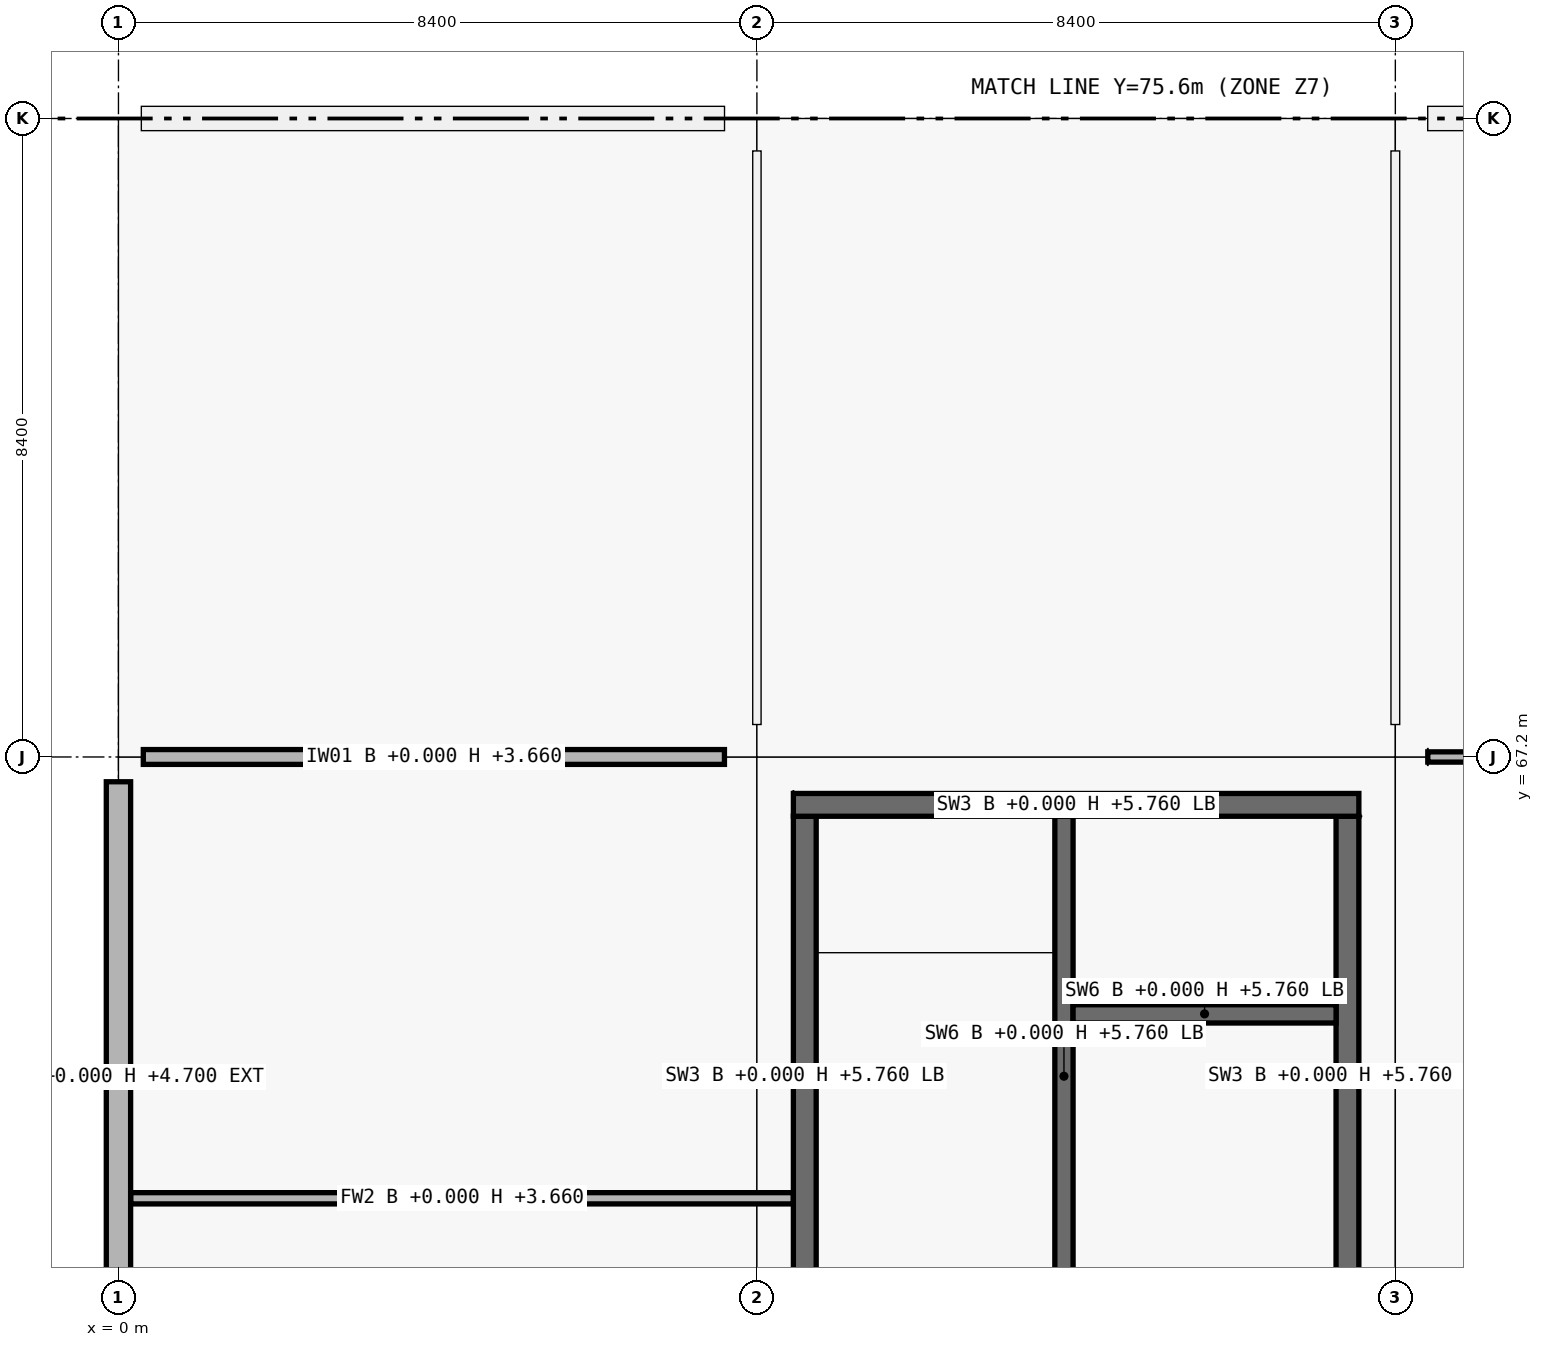
"""IFC4 building model, lengths in metres.
Left out: names, types, materials, properties, quantities, classifications, styles, units other than length and angle.
Written with IfcOpenShell. Run it as: python <this file> out.ifc"""

import sys

from ifc_helpers import new_model, si_unit, direction, frame, frame_2d, origin, origin_2d, place, context, subcontext, project, spatial, rectangle, extrude, element, fill, save


model = new_model("IFC4")
c1 = context("Model", 3, precision=1e-05, world=origin(), true_north=direction((0.0, 1.0)))
c2 = subcontext(c1, "Body", "Model", "MODEL_VIEW")
j1 = project(units=[si_unit("LENGTHUNIT", "METRE"), si_unit("PLANEANGLEUNIT", "RADIAN")], contexts=[c1])
p1 = place(None, origin())
s1 = spatial("IfcSite", under=j1, at=p1, CompositionType="ELEMENT")
p2 = place(p1, origin())
s2 = spatial("IfcBuilding", under=s1, at=p2, CompositionType="ELEMENT")
p3 = place(p2, origin())
s3 = spatial("IfcBuildingStorey", under=s2, at=p3, CompositionType="ELEMENT", Elevation=0.0)
p4 = place(p3, frame((0.0, 67.2, 0.0), z_axis=(0.0, 0.0, 1.0), x_axis=(1.0, 0.0, 0.0)))
e1 = element("IfcColumn", 1, at=p4, inside=s3, PredefinedType="COLUMN", context=c2, shape_type="SweptSolid", body=[
    extrude(rectangle(XDim=0.65, YDim=0.65, at=origin_2d()), origin(), (0.0, 0.0, 1.0), 5.76),
])
p5 = place(p3, frame((0.0, 75.6, 0.0), z_axis=(0.0, 0.0, 1.0), x_axis=(1.0, 0.0, 0.0)))
e2 = element("IfcColumn", 2, at=p5, inside=s3, PredefinedType="COLUMN", context=c2, shape_type="SweptSolid", body=[
    extrude(rectangle(XDim=0.6, YDim=0.6, at=origin_2d()), origin(), (0.0, 0.0, 1.0), 5.76),
])
for number, where, z_axis, x_axis in (
    (3, (8.4, 67.2, 0.0), (0.0, 0.0, 1.0), (1.0, 0.0, 0.0)),
    (4, (8.4, 75.6, 0.0), (0.0, 0.0, 1.0), (1.0, 0.0, 0.0)),
    (5, (16.8, 67.2, 0.0), (0.0, 0.0, 1.0), (1.0, 0.0, 0.0)),
    (6, (16.8, 75.6, 0.0), (0.0, 0.0, 1.0), (1.0, 0.0, 0.0)),
):
    element("IfcColumn", number, at=place(p3, frame(where, z_axis=z_axis, x_axis=x_axis)), inside=s3, PredefinedType="COLUMN", context=c2, shape_type="SweptSolid", body=[
        extrude(rectangle(XDim=0.85, YDim=0.85, at=origin_2d()), origin(), (0.0, 0.0, 1.0), 5.76),
    ])
p6 = place(p3, frame((0.0, 59.101, 0.0), z_axis=(0.0, 0.0, 1.0), x_axis=(0.0, 1.0, 0.0)))
e7 = element("IfcWall", 7, at=p6, inside=s3, PredefinedType="SOLIDWALL", context=c2, shape_type="SweptSolid", body=[
    extrude(rectangle(XDim=7.773, YDim=0.32, at=frame_2d((3.886, 0.0))), origin(), (0.0, 0.0, 1.0), 4.7),
])
p7 = place(p6, frame((3.136, 0.0, 0.9)))
e8 = element("IfcOpeningElement", 8, at=p7, cuts=e7, PredefinedType="OPENING", context=c2, shape_type="SweptSolid", body=[
    extrude(rectangle(XDim=1.5, YDim=1.8, at=frame_2d((0.75, 0.9))), frame((0.0, 0.16, 0.0), z_axis=(0.0, -1.0, 0.0), x_axis=(1.0, 0.0, 0.0)), (0.0, 0.0, 1.0), 0.32),
])
p8 = place(p6, frame((0.149, 0.0, 0.0)))
e9 = element("IfcOpeningElement", 9, at=p8, cuts=e7, PredefinedType="OPENING", context=c2, shape_type="SweptSolid", body=[
    extrude(rectangle(XDim=2.0, YDim=2.25, at=frame_2d((1.0, 1.125))), frame((0.0, 0.16, 0.0), z_axis=(0.0, -1.0, 0.0), x_axis=(1.0, 0.0, 0.0)), (0.0, 0.0, 1.0), 0.32),
])
p9 = place(p3, frame((0.301, 75.6, 0.0), z_axis=(0.0, 0.0, 1.0), x_axis=(1.0, 0.0, 0.0)))
e10 = element("IfcWall", 10, at=p9, inside=s3, PredefinedType="SOLIDWALL", context=c2, shape_type="SweptSolid", body=[
    extrude(rectangle(XDim=7.673, YDim=0.32, at=frame_2d((3.836, 0.0))), origin(), (0.0, 0.0, 1.0), 4.7),
])
p10 = place(p9, frame((3.037, 0.0, 0.9)))
e11 = element("IfcOpeningElement", 11, at=p10, cuts=e10, PredefinedType="OPENING", context=c2, shape_type="SweptSolid", body=[
    extrude(rectangle(XDim=1.6, YDim=2.1, at=frame_2d((0.8, 1.05))), frame((0.0, 0.16, 0.0), z_axis=(0.0, -1.0, 0.0), x_axis=(1.0, 0.0, 0.0)), (0.0, 0.0, 1.0), 0.32),
])
p11 = place(p3, frame((17.226, 75.6, 0.0), z_axis=(0.0, 0.0, 1.0), x_axis=(1.0, 0.0, 0.0)))
e12 = element("IfcWall", 12, at=p11, inside=s3, PredefinedType="SOLIDWALL", context=c2, shape_type="SweptSolid", body=[
    extrude(rectangle(XDim=7.548, YDim=0.32, at=frame_2d((3.774, 0.0))), origin(), (0.0, 0.0, 1.0), 4.7),
])
p12 = place(p11, frame((2.474, 0.0, 0.9)))
e13 = element("IfcOpeningElement", 13, at=p12, cuts=e12, PredefinedType="OPENING", context=c2, shape_type="SweptSolid", body=[
    extrude(rectangle(XDim=2.6, YDim=2.1, at=frame_2d((1.3, 1.05))), frame((0.0, 0.16, 0.0), z_axis=(0.0, -1.0, 0.0), x_axis=(1.0, 0.0, 0.0)), (0.0, 0.0, 1.0), 0.32),
])
p13 = place(p3, frame((9.03, 59.58, 0.0), z_axis=(0.0, 0.0, 1.0), x_axis=(0.0, 1.0, 0.0)))
e14 = element("IfcWall", 14, at=p13, inside=s3, PredefinedType="SHEAR", context=c2, shape_type="SweptSolid", body=[
    extrude(rectangle(XDim=6.84, YDim=0.3, at=frame_2d((3.42, 0.0))), origin(), (0.0, 0.0, 1.0), 5.76),
])
p14 = place(p13, frame((0.12, 0.0, 0.0)))
e15 = element("IfcOpeningElement", 15, at=p14, cuts=e14, PredefinedType="OPENING", context=c2, shape_type="SweptSolid", body=[
    extrude(rectangle(XDim=1.0, YDim=2.15, at=frame_2d((0.5, 1.075))), frame((0.0, 0.15, 0.0), z_axis=(0.0, -1.0, 0.0), x_axis=(1.0, 0.0, 0.0)), (0.0, 0.0, 1.0), 0.3),
])
p15 = place(p3, frame((8.88, 66.57, 0.0), z_axis=(0.0, 0.0, 1.0), x_axis=(1.0, 0.0, 0.0)))
e16 = element("IfcWall", 16, at=p15, inside=s3, PredefinedType="SHEAR", context=c2, shape_type="SweptSolid", body=[
    extrude(rectangle(XDim=7.44, YDim=0.3, at=frame_2d((3.72, 0.0))), origin(), (0.0, 0.0, 1.0), 5.76),
])
p16 = place(p3, frame((16.17, 66.42, 0.0), z_axis=(0.0, 0.0, 1.0), x_axis=(0.0, -1.0, 0.0)))
e17 = element("IfcWall", 17, at=p16, inside=s3, PredefinedType="SHEAR", context=c2, shape_type="SweptSolid", body=[
    extrude(rectangle(XDim=6.84, YDim=0.3, at=frame_2d((3.42, 0.0))), origin(), (0.0, 0.0, 1.0), 5.76),
])
p17 = place(p3, frame((12.44, 59.58, 0.0), z_axis=(0.0, 0.0, 1.0), x_axis=(0.0, 1.0, 0.0)))
e18 = element("IfcWall", 18, at=p17, inside=s3, PredefinedType="SHEAR", context=c2, shape_type="SweptSolid", body=[
    extrude(rectangle(XDim=6.84, YDim=0.24, at=frame_2d((3.42, 0.0))), origin(), (0.0, 0.0, 1.0), 5.76),
])
p18 = place(p17, frame((0.12, 0.0, 0.0)))
e19 = element("IfcOpeningElement", 19, at=p18, cuts=e18, PredefinedType="OPENING", context=c2, shape_type="SweptSolid", body=[
    extrude(rectangle(XDim=1.0, YDim=2.15, at=frame_2d((0.5, 1.075))), frame((0.0, 0.12, 0.0), z_axis=(0.0, -1.0, 0.0), x_axis=(1.0, 0.0, 0.0)), (0.0, 0.0, 1.0), 0.24),
])
p19 = place(p3, frame((12.56, 63.82, 0.0), z_axis=(0.0, 0.0, 1.0), x_axis=(1.0, 0.0, 0.0)))
e20 = element("IfcWall", 20, at=p19, inside=s3, PredefinedType="SHEAR", context=c2, shape_type="SweptSolid", body=[
    extrude(rectangle(XDim=3.46, YDim=0.24, at=frame_2d((1.73, 0.0))), origin(), (0.0, 0.0, 1.0), 5.76),
])
p20 = place(p19, frame((1.18, 0.0, 0.0)))
e21 = element("IfcOpeningElement", 21, at=p20, cuts=e20, PredefinedType="OPENING", context=c2, shape_type="SweptSolid", body=[
    extrude(rectangle(XDim=1.1, YDim=2.15, at=frame_2d((0.55, 1.075))), frame((0.0, 0.12, 0.0), z_axis=(0.0, -1.0, 0.0), x_axis=(1.0, 0.0, 0.0)), (0.0, 0.0, 1.0), 0.24),
])
p21 = place(p3, frame((0.327, 67.2, 0.0), z_axis=(0.0, 0.0, 1.0), x_axis=(1.0, 0.0, 0.0)))
e22 = element("IfcWall", 22, at=p21, inside=s3, PredefinedType="PARTITIONING", context=c2, shape_type="SweptSolid", body=[
    extrude(rectangle(XDim=7.646, YDim=0.195, at=frame_2d((3.823, 0.0))), origin(), (0.0, 0.0, 1.0), 3.66),
])
p22 = place(p21, frame((3.313, 0.0, 0.0)))
e23 = element("IfcOpeningElement", 23, at=p22, cuts=e22, PredefinedType="OPENING", context=c2, shape_type="SweptSolid", body=[
    extrude(rectangle(XDim=1.02, YDim=2.2, at=frame_2d((0.51, 1.1))), frame((0.0, 0.098, 0.0), z_axis=(0.0, -1.0, 0.0), x_axis=(1.0, 0.0, 0.0)), (0.0, 0.0, 1.0), 0.195),
])
p23 = place(p3, frame((17.227, 67.2, 0.0), z_axis=(0.0, 0.0, 1.0), x_axis=(1.0, 0.0, 0.0)))
e24 = element("IfcWall", 24, at=p23, inside=s3, PredefinedType="PARTITIONING", context=c2, shape_type="SweptSolid", body=[
    extrude(rectangle(XDim=7.546, YDim=0.135, at=frame_2d((3.773, 0.0))), origin(), (0.0, 0.0, 1.0), 3.66),
])
p24 = place(p23, frame((3.283, 0.0, 0.0)))
e25 = element("IfcOpeningElement", 25, at=p24, cuts=e24, PredefinedType="OPENING", context=c2, shape_type="SweptSolid", body=[
    extrude(rectangle(XDim=0.98, YDim=2.18, at=frame_2d((0.49, 1.09))), frame((0.0, 0.067, 0.0), z_axis=(0.0, -1.0, 0.0), x_axis=(1.0, 0.0, 0.0)), (0.0, 0.0, 1.0), 0.135),
])
p25 = place(p3, frame((8.4, 67.627, 0.0), z_axis=(0.0, 0.0, 1.0), x_axis=(0.0, 1.0, 0.0)))
e26 = element("IfcWall", 26, at=p25, inside=s3, PredefinedType="MOVABLE", context=c2, shape_type="SweptSolid", body=[
    extrude(rectangle(XDim=7.546, YDim=0.11, at=frame_2d((3.773, 0.0))), origin(), (0.0, 0.0, 1.0), 3.66),
])
p26 = place(p25, frame((3.273, 0.0, 0.0)))
e27 = element("IfcOpeningElement", 27, at=p26, cuts=e26, PredefinedType="OPENING", context=c2, shape_type="SweptSolid", body=[
    extrude(rectangle(XDim=1.0, YDim=2.2, at=frame_2d((0.5, 1.1))), frame((0.0, 0.055, 0.0), z_axis=(0.0, -1.0, 0.0), x_axis=(1.0, 0.0, 0.0)), (0.0, 0.0, 1.0), 0.11),
])
p27 = place(p3, frame((16.8, 67.627, 0.0), z_axis=(0.0, 0.0, 1.0), x_axis=(0.0, 1.0, 0.0)))
e28 = element("IfcWall", 28, at=p27, inside=s3, PredefinedType="PARTITIONING", context=c2, shape_type="SweptSolid", body=[
    extrude(rectangle(XDim=7.546, YDim=0.115, at=frame_2d((3.773, 0.0))), origin(), (0.0, 0.0, 1.0), 3.66),
])
p28 = place(p27, frame((3.248, 0.0, 0.0)))
e29 = element("IfcOpeningElement", 29, at=p28, cuts=e28, PredefinedType="OPENING", context=c2, shape_type="SweptSolid", body=[
    extrude(rectangle(XDim=1.05, YDim=2.12, at=frame_2d((0.525, 1.06))), frame((0.0, 0.058, 0.0), z_axis=(0.0, -1.0, 0.0), x_axis=(1.0, 0.0, 0.0)), (0.0, 0.0, 1.0), 0.115),
])
p29 = place(p3, frame((0.16, 61.394, 0.0), z_axis=(0.0, 0.0, 1.0), x_axis=(1.0, 0.0, 0.0)))
e30 = element("IfcWall", 30, at=p29, inside=s3, PredefinedType="PARTITIONING", context=c2, shape_type="SweptSolid", body=[
    extrude(rectangle(XDim=8.72, YDim=0.148, at=frame_2d((4.36, 0.0))), origin(), (0.0, 0.0, 1.0), 3.66),
])
p30 = place(p7, origin())
e31 = element("IfcWindow", 31, at=p30, inside=s3, PartitioningType="SINGLE_PANEL", PredefinedType="WINDOW", context=c2, shape_type="SweptSolid", body=[
    extrude(rectangle(XDim=1.5, YDim=1.8, at=frame_2d((0.75, 0.9))), frame((0.0, 0.03, 0.0), z_axis=(0.0, -1.0, 0.0), x_axis=(1.0, 0.0, 0.0)), (0.0, 0.0, 1.0), 0.06),
])
fill(e8, e31)
p31 = place(p8, origin())
e32 = element("IfcDoor", 32, at=p31, inside=s3, OperationType="DOUBLE_DOOR_SINGLE_SWING", PredefinedType="DOOR", context=c2, shape_type="SweptSolid", body=[
    extrude(rectangle(XDim=2.0, YDim=2.25, at=frame_2d((1.0, 1.125))), frame((0.0, 0.025, 0.0), z_axis=(0.0, -1.0, 0.0), x_axis=(1.0, 0.0, 0.0)), (0.0, 0.0, 1.0), 0.05),
])
fill(e9, e32)
p32 = place(p10, origin())
e33 = element("IfcWindow", 33, at=p32, inside=s3, PartitioningType="SINGLE_PANEL", PredefinedType="WINDOW", context=c2, shape_type="SweptSolid", body=[
    extrude(rectangle(XDim=1.6, YDim=2.1, at=frame_2d((0.8, 1.05))), frame((0.0, 0.03, 0.0), z_axis=(0.0, -1.0, 0.0), x_axis=(1.0, 0.0, 0.0)), (0.0, 0.0, 1.0), 0.06),
])
fill(e11, e33)
p33 = place(p18, origin())
e34 = element("IfcDoor", 34, at=p33, inside=s3, OperationType="SINGLE_SWING_LEFT", PredefinedType="DOOR", context=c2, shape_type="SweptSolid", body=[
    extrude(rectangle(XDim=1.0, YDim=2.15, at=frame_2d((0.5, 1.075))), frame((0.0, 0.025, 0.0), z_axis=(0.0, -1.0, 0.0), x_axis=(1.0, 0.0, 0.0)), (0.0, 0.0, 1.0), 0.05),
])
fill(e19, e34)
p34 = place(p14, origin())
e35 = element("IfcDoor", 35, at=p34, inside=s3, OperationType="SINGLE_SWING_RIGHT", PredefinedType="DOOR", context=c2, shape_type="SweptSolid", body=[
    extrude(rectangle(XDim=1.0, YDim=2.15, at=frame_2d((0.5, 1.075))), frame((0.0, 0.025, 0.0), z_axis=(0.0, -1.0, 0.0), x_axis=(1.0, 0.0, 0.0)), (0.0, 0.0, 1.0), 0.05),
])
fill(e15, e35)
p35 = place(p20, origin())
e36 = element("IfcDoor", 36, at=p35, inside=s3, OperationType="DOUBLE_DOOR_SLIDING", PredefinedType="DOOR", context=c2, shape_type="SweptSolid", body=[
    extrude(rectangle(XDim=1.1, YDim=2.15, at=frame_2d((0.55, 1.075))), frame((0.0, 0.025, 0.0), z_axis=(0.0, -1.0, 0.0), x_axis=(1.0, 0.0, 0.0)), (0.0, 0.0, 1.0), 0.05),
])
fill(e21, e36)
p36 = place(p22, origin())
e37 = element("IfcDoor", 37, at=p36, inside=s3, OperationType="SINGLE_SWING_LEFT", PredefinedType="DOOR", context=c2, shape_type="SweptSolid", body=[
    extrude(rectangle(XDim=1.02, YDim=2.2, at=frame_2d((0.51, 1.1))), frame((0.0, 0.025, 0.0), z_axis=(0.0, -1.0, 0.0), x_axis=(1.0, 0.0, 0.0)), (0.0, 0.0, 1.0), 0.05),
])
fill(e23, e37)
p37 = place(p26, origin())
e38 = element("IfcDoor", 38, at=p37, inside=s3, OperationType="SINGLE_SWING_RIGHT", PredefinedType="DOOR", context=c2, shape_type="SweptSolid", body=[
    extrude(rectangle(XDim=1.0, YDim=2.2, at=frame_2d((0.5, 1.1))), frame((0.0, 0.025, 0.0), z_axis=(0.0, -1.0, 0.0), x_axis=(1.0, 0.0, 0.0)), (0.0, 0.0, 1.0), 0.05),
])
fill(e27, e38)
p38 = place(p28, origin())
e39 = element("IfcDoor", 39, at=p38, inside=s3, OperationType="SINGLE_SWING_RIGHT", PredefinedType="DOOR", context=c2, shape_type="SweptSolid", body=[
    extrude(rectangle(XDim=1.05, YDim=2.12, at=frame_2d((0.525, 1.06))), frame((0.0, 0.025, 0.0), z_axis=(0.0, -1.0, 0.0), x_axis=(1.0, 0.0, 0.0)), (0.0, 0.0, 1.0), 0.05),
])
fill(e29, e39)
save(model, sys.argv[1])
